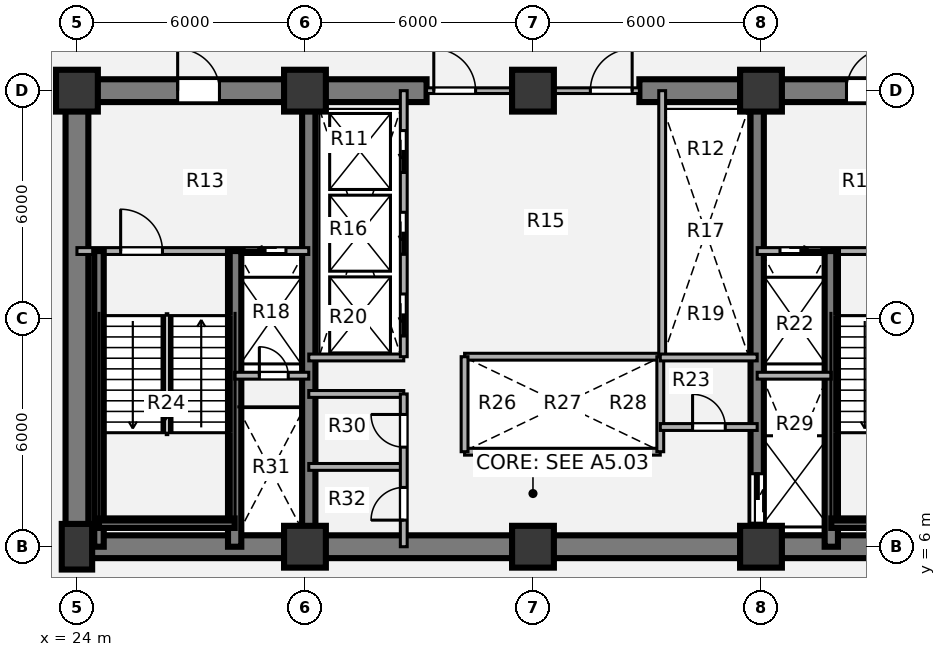
"""IFC4 building model, lengths in metres.
Left out: names, types, materials, properties, quantities, classifications, styles, units other than length and angle.
Written with IfcOpenShell. Run it as: python <this file> out.ifc"""

import sys

from ifc_helpers import new_model, si_unit, direction, frame, frame_2d, origin, origin_2d, place, context, subcontext, project, spatial, rectangle, extrude, source, transform, mapped, element, fill, save


model = new_model("IFC4")
c1 = context("Model", 3, precision=1e-05, world=origin(), true_north=direction((0.0, 1.0)))
c2 = subcontext(c1, "Body", "Model", "MODEL_VIEW")
j1 = project(units=[si_unit("LENGTHUNIT", "METRE"), si_unit("PLANEANGLEUNIT", "RADIAN")], contexts=[c1])
p1 = place(None, origin())
s1 = spatial("IfcSite", under=j1, at=p1, CompositionType="ELEMENT")
p2 = place(p1, origin())
s2 = spatial("IfcBuilding", under=s1, at=p2, CompositionType="ELEMENT")
p3 = place(p2, frame((0.0, 0.0, 18.36)))
s3 = spatial("IfcBuildingStorey", under=s2, at=p3, CompositionType="ELEMENT", Elevation=18.36)
m1 = source(origin(), c2, "Body", "SweptSolid", [
    extrude(rectangle(XDim=0.8, YDim=1.2, at=origin_2d()), origin(), (0.0, 0.0, 1.0), 4.32),
])
p4 = place(p3, frame((24.0, 6.0, 0.0), z_axis=(0.0, 0.0, 1.0), x_axis=(1.0, 0.0, 0.0)))
e1 = element("IfcColumn", 1, at=p4, inside=s3, PredefinedType="COLUMN", context=c2, shape_type="MappedRepresentation", body=[
    mapped(m1, transform((0.0, 0.0, 0.0), x_axis=(1.0, 0.0, 0.0), y_axis=(0.0, 1.0, 0.0), z_axis=(0.0, 0.0, 1.0), scale=1.0)),
])
m2 = source(origin(), c2, "Body", "SweptSolid", [
    extrude(rectangle(XDim=1.1, YDim=1.1, at=origin_2d()), origin(), (0.0, 0.0, 1.0), 4.32),
])
for number, where, z_axis, x_axis in (
    (2, (30.0, 6.0, 0.0), (0.0, 0.0, 1.0), (1.0, 0.0, 0.0)),
    (3, (36.0, 6.0, 0.0), (0.0, 0.0, 1.0), (1.0, 0.0, 0.0)),
    (4, (42.0, 6.0, 0.0), (0.0, 0.0, 1.0), (1.0, 0.0, 0.0)),
    (5, (24.0, 18.0, 0.0), (0.0, 0.0, 1.0), (1.0, 0.0, 0.0)),
    (6, (30.0, 18.0, 0.0), (0.0, 0.0, 1.0), (1.0, 0.0, 0.0)),
    (7, (36.0, 18.0, 0.0), (0.0, 0.0, 1.0), (1.0, 0.0, 0.0)),
    (8, (42.0, 18.0, 0.0), (0.0, 0.0, 1.0), (1.0, 0.0, 0.0)),
):
    element("IfcColumn", number, at=place(p3, frame(where, z_axis=z_axis, x_axis=x_axis)), inside=s3, PredefinedType="COLUMN", context=c2, shape_type="MappedRepresentation", body=[
        mapped(m2, transform((0.0, 0.0, 0.0), x_axis=(1.0, 0.0, 0.0), y_axis=(0.0, 1.0, 0.0), z_axis=(0.0, 0.0, 1.0), scale=1.0)),
    ])
p5 = place(p3, frame((48.3, 6.0, 0.0), z_axis=(0.0, 0.0, 1.0), x_axis=(-1.0, 0.0, 0.0)))
e9 = element("IfcWall", 9, at=p5, inside=s3, PredefinedType="SHEAR", context=c2, shape_type="SweptSolid", body=[
    extrude(rectangle(XDim=24.6, YDim=0.6, at=frame_2d((12.3, 0.0))), origin(), (0.0, 0.0, 1.0), 4.32),
])
p6 = place(p3, frame((24.0, 6.0, 0.0), z_axis=(0.0, 0.0, 1.0), x_axis=(0.0, 1.0, 0.0)))
e10 = element("IfcWall", 10, at=p6, inside=s3, PredefinedType="SHEAR", context=c2, shape_type="SweptSolid", body=[
    extrude(rectangle(XDim=12.0, YDim=0.6, at=frame_2d((6.0, 0.0))), origin(), (0.0, 0.0, 1.0), 4.32),
])
p7 = place(p3, frame((23.7, 18.0, 0.0), z_axis=(0.0, 0.0, 1.0), x_axis=(1.0, 0.0, 0.0)))
e11 = element("IfcWall", 11, at=p7, inside=s3, PredefinedType="SHEAR", context=c2, shape_type="SweptSolid", body=[
    extrude(rectangle(XDim=9.5, YDim=0.6, at=frame_2d((4.75, 0.0))), origin(), (0.0, 0.0, 1.0), 4.32),
])
p8 = place(p7, frame((2.95, 0.0, 0.0)))
e12 = element("IfcOpeningElement", 12, at=p8, cuts=e11, PredefinedType="OPENING", context=c2, shape_type="SweptSolid", body=[
    extrude(rectangle(XDim=1.1, YDim=2.1, at=origin_2d()), frame((0.55, 0.31, 1.05), z_axis=(0.0, -1.0, 0.0), x_axis=(1.0, 0.0, 0.0)), (0.0, 0.0, 1.0), 0.62),
])
p9 = place(p3, frame((38.8, 18.0, 0.0), z_axis=(0.0, 0.0, 1.0), x_axis=(1.0, 0.0, 0.0)))
e13 = element("IfcWall", 13, at=p9, inside=s3, PredefinedType="SHEAR", context=c2, shape_type="SweptSolid", body=[
    extrude(rectangle(XDim=9.5, YDim=0.6, at=frame_2d((4.75, 0.0))), origin(), (0.0, 0.0, 1.0), 4.32),
])
p10 = place(p9, frame((5.45, 0.0, 0.0)))
e14 = element("IfcOpeningElement", 14, at=p10, cuts=e13, PredefinedType="OPENING", context=c2, shape_type="SweptSolid", body=[
    extrude(rectangle(XDim=1.1, YDim=2.1, at=origin_2d()), frame((0.55, 0.31, 1.05), z_axis=(0.0, -1.0, 0.0), x_axis=(1.0, 0.0, 0.0)), (0.0, 0.0, 1.0), 0.62),
])
p11 = place(p3, frame((30.1, 6.0, 0.0), z_axis=(0.0, 0.0, 1.0), x_axis=(0.0, 1.0, 0.0)))
e15 = element("IfcWall", 15, at=p11, inside=s3, PredefinedType="SHEAR", context=c2, shape_type="SweptSolid", body=[
    extrude(rectangle(XDim=12.0, YDim=0.35, at=frame_2d((6.0, 0.0))), origin(), (0.0, 0.0, 1.0), 4.32),
])
p12 = place(p3, frame((41.9, 18.0, 0.0), z_axis=(0.0, 0.0, 1.0), x_axis=(0.0, -1.0, 0.0)))
e16 = element("IfcWall", 16, at=p12, inside=s3, PredefinedType="SHEAR", context=c2, shape_type="SweptSolid", body=[
    extrude(rectangle(XDim=12.0, YDim=0.35, at=frame_2d((6.0, 0.0))), origin(), (0.0, 0.0, 1.0), 4.32),
])
p13 = place(p12, frame((10.08, 0.0, 0.0)))
e17 = element("IfcOpeningElement", 17, at=p13, cuts=e16, PredefinedType="OPENING", context=c2, shape_type="SweptSolid", body=[
    extrude(rectangle(XDim=1.3, YDim=2.1, at=origin_2d()), frame((0.65, 0.185, 1.05), z_axis=(0.0, -1.0, 0.0), x_axis=(1.0, 0.0, 0.0)), (0.0, 0.0, 1.0), 0.37),
])
for number, where, z_axis, x_axis in (
    (18, (34.2, 11.0, 0.0), (0.0, 0.0, 1.0), (1.0, 0.0, 0.0)),
    (19, (34.2, 8.5, 0.0), (0.0, 0.0, 1.0), (1.0, 0.0, 0.0)),
):
    element("IfcWall", number, at=place(p3, frame(where, z_axis=z_axis, x_axis=x_axis)), inside=s3, PredefinedType="PARTITIONING", context=c2, shape_type="SweptSolid", body=[
        extrude(rectangle(XDim=5.15, YDim=0.18, at=frame_2d((2.575, 0.0))), origin(), (0.0, 0.0, 1.0), 4.01),
    ])
for number, where, z_axis, x_axis in (
    (20, (34.2, 8.5, 0.0), (0.0, 0.0, 1.0), (0.0, 1.0, 0.0)),
    (21, (39.35, 8.5, 0.0), (0.0, 0.0, 1.0), (0.0, 1.0, 0.0)),
):
    element("IfcWall", number, at=place(p3, frame(where, z_axis=z_axis, x_axis=x_axis)), inside=s3, PredefinedType="PARTITIONING", context=c2, shape_type="SweptSolid", body=[
        extrude(rectangle(XDim=2.5, YDim=0.18, at=frame_2d((1.25, 0.0))), origin(), (0.0, 0.0, 1.0), 4.01),
    ])
p14 = place(p3, frame((39.4, 11.0, 0.0), z_axis=(0.0, 0.0, 1.0), x_axis=(0.0, 1.0, 0.0)))
e22 = element("IfcWall", 22, at=p14, inside=s3, PredefinedType="PARTITIONING", context=c2, shape_type="SweptSolid", body=[
    extrude(rectangle(XDim=7.0, YDim=0.18, at=frame_2d((3.5, 0.0))), origin(), (0.0, 0.0, 1.0), 4.01),
])
p15 = place(p3, frame((30.1, 10.98, 0.0), z_axis=(0.0, 0.0, 1.0), x_axis=(1.0, 0.0, 0.0)))
e23 = element("IfcWall", 23, at=p15, inside=s3, PredefinedType="PARTITIONING", context=c2, shape_type="SweptSolid", body=[
    extrude(rectangle(XDim=2.5, YDim=0.18, at=frame_2d((1.25, 0.0))), origin(), (0.0, 0.0, 1.0), 4.01),
])
p16 = place(p3, frame((39.35, 10.98, 0.0), z_axis=(0.0, 0.0, 1.0), x_axis=(1.0, 0.0, 0.0)))
e24 = element("IfcWall", 24, at=p16, inside=s3, PredefinedType="PARTITIONING", context=c2, shape_type="SweptSolid", body=[
    extrude(rectangle(XDim=2.55, YDim=0.18, at=frame_2d((1.275, 0.0))), origin(), (0.0, 0.0, 1.0), 4.01),
])
for number, where, z_axis, x_axis in (
    (25, (30.1, 8.1, 0.0), (0.0, 0.0, 1.0), (1.0, 0.0, 0.0)),
    (26, (30.1, 10.02, 0.0), (0.0, 0.0, 1.0), (1.0, 0.0, 0.0)),
):
    element("IfcWall", number, at=place(p3, frame(where, z_axis=z_axis, x_axis=x_axis)), inside=s3, PredefinedType="PARTITIONING", context=c2, shape_type="SweptSolid", body=[
        extrude(rectangle(XDim=2.5, YDim=0.18, at=frame_2d((1.25, 0.0))), origin(), (0.0, 0.0, 1.0), 4.01),
    ])
p17 = place(p3, frame((32.6, 6.0, 0.0), z_axis=(0.0, 0.0, 1.0), x_axis=(0.0, 1.0, 0.0)))
e27 = element("IfcWall", 27, at=p17, inside=s3, PredefinedType="PARTITIONING", context=c2, shape_type="SweptSolid", body=[
    extrude(rectangle(XDim=4.02, YDim=0.18, at=frame_2d((2.01, 0.0))), origin(), (0.0, 0.0, 1.0), 4.01),
])
p18 = place(p17, frame((0.7, 0.0, 0.0)))
e28 = element("IfcOpeningElement", 28, at=p18, cuts=e27, PredefinedType="OPENING", context=c2, shape_type="SweptSolid", body=[
    extrude(rectangle(XDim=0.86, YDim=2.1, at=origin_2d()), frame((0.43, 0.1, 1.05), z_axis=(0.0, -1.0, 0.0), x_axis=(1.0, 0.0, 0.0)), (0.0, 0.0, 1.0), 0.2),
])
p19 = place(p17, frame((2.62, 0.0, 0.0)))
e29 = element("IfcOpeningElement", 29, at=p19, cuts=e27, PredefinedType="OPENING", context=c2, shape_type="SweptSolid", body=[
    extrude(rectangle(XDim=0.86, YDim=2.1, at=origin_2d()), frame((0.43, 0.1, 1.05), z_axis=(0.0, -1.0, 0.0), x_axis=(1.0, 0.0, 0.0)), (0.0, 0.0, 1.0), 0.2),
])
p20 = place(p3, frame((39.35, 9.15, 0.0), z_axis=(0.0, 0.0, 1.0), x_axis=(1.0, 0.0, 0.0)))
e30 = element("IfcWall", 30, at=p20, inside=s3, PredefinedType="PARTITIONING", context=c2, shape_type="SweptSolid", body=[
    extrude(rectangle(XDim=2.55, YDim=0.18, at=frame_2d((1.275, 0.0))), origin(), (0.0, 0.0, 1.0), 4.01),
])
p21 = place(p20, frame((0.85, 0.0, 0.0)))
e31 = element("IfcOpeningElement", 31, at=p21, cuts=e30, PredefinedType="OPENING", context=c2, shape_type="SweptSolid", body=[
    extrude(rectangle(XDim=0.86, YDim=2.1, at=origin_2d()), frame((0.43, 0.1, 1.05), z_axis=(0.0, -1.0, 0.0), x_axis=(1.0, 0.0, 0.0)), (0.0, 0.0, 1.0), 0.2),
])
p22 = place(p3, frame((33.2, 18.0, 0.0), z_axis=(0.0, 0.0, 1.0), x_axis=(1.0, 0.0, 0.0)))
e32 = element("IfcWall", 32, at=p22, inside=s3, PredefinedType="PARTITIONING", context=c2, shape_type="SweptSolid", body=[
    extrude(rectangle(XDim=5.6, YDim=0.15, at=frame_2d((2.8, 0.0))), origin(), (0.0, 0.0, 1.0), 2.825),
])
p23 = place(p22, frame((0.19, 0.0, 0.0)))
e33 = element("IfcOpeningElement", 33, at=p23, cuts=e32, PredefinedType="OPENING", context=c2, shape_type="SweptSolid", body=[
    extrude(rectangle(XDim=1.1, YDim=2.1, at=origin_2d()), frame((0.55, 0.085, 1.05), z_axis=(0.0, -1.0, 0.0), x_axis=(1.0, 0.0, 0.0)), (0.0, 0.0, 1.0), 0.17),
])
p24 = place(p22, frame((4.31, 0.0, 0.0)))
e34 = element("IfcOpeningElement", 34, at=p24, cuts=e32, PredefinedType="OPENING", context=c2, shape_type="SweptSolid", body=[
    extrude(rectangle(XDim=1.1, YDim=2.1, at=origin_2d()), frame((0.55, 0.085, 1.05), z_axis=(0.0, -1.0, 0.0), x_axis=(1.0, 0.0, 0.0)), (0.0, 0.0, 1.0), 0.17),
])
p25 = place(p3, frame((24.0, 13.78, 0.0), z_axis=(0.0, 0.0, 1.0), x_axis=(1.0, 0.0, 0.0)))
e35 = element("IfcWall", 35, at=p25, inside=s3, PredefinedType="PARTITIONING", context=c2, shape_type="SweptSolid", body=[
    extrude(rectangle(XDim=6.1, YDim=0.18, at=frame_2d((3.05, 0.0))), origin(), (0.0, 0.0, 1.0), 4.01),
])
p26 = place(p25, frame((1.15, 0.0, 0.0)))
e36 = element("IfcOpeningElement", 36, at=p26, cuts=e35, PredefinedType="OPENING", context=c2, shape_type="SweptSolid", body=[
    extrude(rectangle(XDim=1.1, YDim=2.1, at=origin_2d()), frame((0.55, 0.1, 1.05), z_axis=(0.0, -1.0, 0.0), x_axis=(1.0, 0.0, 0.0)), (0.0, 0.0, 1.0), 0.2),
])
p27 = place(p25, frame((4.4, 0.0, 0.0)))
e37 = element("IfcOpeningElement", 37, at=p27, cuts=e35, PredefinedType="OPENING", context=c2, shape_type="SweptSolid", body=[
    extrude(rectangle(XDim=1.1, YDim=2.1, at=origin_2d()), frame((0.55, 0.1, 1.05), z_axis=(0.0, -1.0, 0.0), x_axis=(1.0, 0.0, 0.0)), (0.0, 0.0, 1.0), 0.2),
])
p28 = place(p3, frame((28.15, 6.0, 0.0), z_axis=(0.0, 0.0, 1.0), x_axis=(0.0, 1.0, 0.0)))
e38 = element("IfcWall", 38, at=p28, inside=s3, PredefinedType="SHEAR", context=c2, shape_type="SweptSolid", body=[
    extrude(rectangle(XDim=7.78, YDim=0.35, at=frame_2d((3.89, 0.0))), origin(), (0.0, 0.0, 1.0), 4.36),
])
p29 = place(p3, frame((24.58, 6.0, 0.0), z_axis=(0.0, 0.0, 1.0), x_axis=(0.0, 1.0, 0.0)))
e39 = element("IfcWall", 39, at=p29, inside=s3, PredefinedType="SHEAR", context=c2, shape_type="SweptSolid", body=[
    extrude(rectangle(XDim=7.78, YDim=0.25, at=frame_2d((3.89, 0.0))), origin(), (0.0, 0.0, 1.0), 4.36),
])
p30 = place(p3, frame((24.58, 6.62, 0.0), z_axis=(0.0, 0.0, 1.0), x_axis=(1.0, 0.0, 0.0)))
e40 = element("IfcWall", 40, at=p30, inside=s3, PredefinedType="SHEAR", context=c2, shape_type="SweptSolid", body=[
    extrude(rectangle(XDim=3.57, YDim=0.25, at=frame_2d((1.785, 0.0))), origin(), (0.0, 0.0, 1.0), 4.36),
])
p31 = place(p3, frame((28.15, 10.5, 0.0), z_axis=(0.0, 0.0, 1.0), x_axis=(1.0, 0.0, 0.0)))
e41 = element("IfcWall", 41, at=p31, inside=s3, PredefinedType="PARTITIONING", context=c2, shape_type="SweptSolid", body=[
    extrude(rectangle(XDim=1.95, YDim=0.18, at=frame_2d((0.975, 0.0))), origin(), (0.0, 0.0, 1.0), 4.01),
])
p32 = place(p31, frame((0.65, 0.0, 0.0)))
e42 = element("IfcOpeningElement", 42, at=p32, cuts=e41, PredefinedType="OPENING", context=c2, shape_type="SweptSolid", body=[
    extrude(rectangle(XDim=0.76, YDim=2.05, at=origin_2d()), frame((0.38, 0.1, 1.025), z_axis=(0.0, -1.0, 0.0), x_axis=(1.0, 0.0, 0.0)), (0.0, 0.0, 1.0), 0.2),
])
p33 = place(p3, frame((41.9, 13.78, 0.0), z_axis=(0.0, 0.0, 1.0), x_axis=(1.0, 0.0, 0.0)))
e43 = element("IfcWall", 43, at=p33, inside=s3, PredefinedType="PARTITIONING", context=c2, shape_type="SweptSolid", body=[
    extrude(rectangle(XDim=6.1, YDim=0.18, at=frame_2d((3.05, 0.0))), origin(), (0.0, 0.0, 1.0), 4.01),
])
p34 = place(p33, frame((0.6, 0.0, 0.0)))
e44 = element("IfcOpeningElement", 44, at=p34, cuts=e43, PredefinedType="OPENING", context=c2, shape_type="SweptSolid", body=[
    extrude(rectangle(XDim=1.1, YDim=2.1, at=origin_2d()), frame((0.55, 0.1, 1.05), z_axis=(0.0, -1.0, 0.0), x_axis=(1.0, 0.0, 0.0)), (0.0, 0.0, 1.0), 0.2),
])
p35 = place(p33, frame((3.8, 0.0, 0.0)))
e45 = element("IfcOpeningElement", 45, at=p35, cuts=e43, PredefinedType="OPENING", context=c2, shape_type="SweptSolid", body=[
    extrude(rectangle(XDim=1.1, YDim=2.1, at=origin_2d()), frame((0.55, 0.1, 1.05), z_axis=(0.0, -1.0, 0.0), x_axis=(1.0, 0.0, 0.0)), (0.0, 0.0, 1.0), 0.2),
])
p36 = place(p3, frame((43.85, 6.0, 0.0), z_axis=(0.0, 0.0, 1.0), x_axis=(0.0, 1.0, 0.0)))
e46 = element("IfcWall", 46, at=p36, inside=s3, PredefinedType="SHEAR", context=c2, shape_type="SweptSolid", body=[
    extrude(rectangle(XDim=7.78, YDim=0.35, at=frame_2d((3.89, 0.0))), origin(), (0.0, 0.0, 1.0), 4.36),
])
p37 = place(p3, frame((43.85, 6.62, 0.0), z_axis=(0.0, 0.0, 1.0), x_axis=(1.0, 0.0, 0.0)))
e47 = element("IfcWall", 47, at=p37, inside=s3, PredefinedType="SHEAR", context=c2, shape_type="SweptSolid", body=[
    extrude(rectangle(XDim=3.57, YDim=0.25, at=frame_2d((1.785, 0.0))), origin(), (0.0, 0.0, 1.0), 4.36),
])
p38 = place(p3, frame((41.9, 10.5, 0.0), z_axis=(0.0, 0.0, 1.0), x_axis=(1.0, 0.0, 0.0)))
e48 = element("IfcWall", 48, at=p38, inside=s3, PredefinedType="PARTITIONING", context=c2, shape_type="SweptSolid", body=[
    extrude(rectangle(XDim=1.95, YDim=0.18, at=frame_2d((0.975, 0.0))), origin(), (0.0, 0.0, 1.0), 4.01),
])
p39 = place(p3, frame((32.6, 11.0, 0.0), z_axis=(0.0, 0.0, 1.0), x_axis=(0.0, 1.0, 0.0)))
e49 = element("IfcWall", 49, at=p39, inside=s3, PredefinedType="PARTITIONING", context=c2, shape_type="SweptSolid", body=[
    extrude(rectangle(XDim=7.0, YDim=0.18, at=frame_2d((3.5, 0.0))), origin(), (0.0, 0.0, 1.0), 4.01),
])
p40 = place(p39, frame((0.55, 0.0, 0.0)))
e50 = element("IfcOpeningElement", 50, at=p40, cuts=e49, PredefinedType="OPENING", context=c2, shape_type="SweptSolid", body=[
    extrude(rectangle(XDim=1.1, YDim=2.1, at=origin_2d()), frame((0.55, 0.1, 1.05), z_axis=(0.0, -1.0, 0.0), x_axis=(1.0, 0.0, 0.0)), (0.0, 0.0, 1.0), 0.2),
])
p41 = place(p39, frame((2.7, 0.0, 0.0)))
e51 = element("IfcOpeningElement", 51, at=p41, cuts=e49, PredefinedType="OPENING", context=c2, shape_type="SweptSolid", body=[
    extrude(rectangle(XDim=1.1, YDim=2.1, at=origin_2d()), frame((0.55, 0.1, 1.05), z_axis=(0.0, -1.0, 0.0), x_axis=(1.0, 0.0, 0.0)), (0.0, 0.0, 1.0), 0.2),
])
p42 = place(p39, frame((4.85, 0.0, 0.0)))
e52 = element("IfcOpeningElement", 52, at=p42, cuts=e49, PredefinedType="OPENING", context=c2, shape_type="SweptSolid", body=[
    extrude(rectangle(XDim=1.1, YDim=2.1, at=origin_2d()), frame((0.55, 0.1, 1.05), z_axis=(0.0, -1.0, 0.0), x_axis=(1.0, 0.0, 0.0)), (0.0, 0.0, 1.0), 0.2),
])
m3 = source(origin(), c2, "Body", "SweptSolid", [
    extrude(rectangle(XDim=0.86, YDim=2.1, at=origin_2d()), frame((0.43, 0.025, 1.05), z_axis=(0.0, -1.0, 0.0), x_axis=(1.0, 0.0, 0.0)), (0.0, 0.0, 1.0), 0.05),
])
p43 = place(p18, origin())
e53 = element("IfcDoor", 53, at=p43, inside=s3, OperationType="SINGLE_SWING_LEFT", PredefinedType="DOOR", context=c2, shape_type="MappedRepresentation", body=[
    mapped(m3, transform((0.0, 0.0, 0.0), x_axis=(1.0, 0.0, 0.0), y_axis=(0.0, 1.0, 0.0), z_axis=(0.0, 0.0, 1.0), scale=1.0)),
])
fill(e28, e53)
p44 = place(p19, origin())
e54 = element("IfcDoor", 54, at=p44, inside=s3, OperationType="SINGLE_SWING_RIGHT", PredefinedType="DOOR", context=c2, shape_type="MappedRepresentation", body=[
    mapped(m3, transform((0.0, 0.0, 0.0), x_axis=(1.0, 0.0, 0.0), y_axis=(0.0, 1.0, 0.0), z_axis=(0.0, 0.0, 1.0), scale=1.0)),
])
fill(e29, e54)
p45 = place(p21, origin())
e55 = element("IfcDoor", 55, at=p45, inside=s3, OperationType="SINGLE_SWING_LEFT", PredefinedType="DOOR", context=c2, shape_type="MappedRepresentation", body=[
    mapped(m3, transform((0.0, 0.0, 0.0), x_axis=(1.0, 0.0, 0.0), y_axis=(0.0, 1.0, 0.0), z_axis=(0.0, 0.0, 1.0), scale=1.0)),
])
fill(e31, e55)
m4 = source(origin(), c2, "Body", "SweptSolid", [
    extrude(rectangle(XDim=1.1, YDim=2.1, at=origin_2d()), frame((0.55, 0.025, 1.05), z_axis=(0.0, -1.0, 0.0), x_axis=(1.0, 0.0, 0.0)), (0.0, 0.0, 1.0), 0.05),
])
p46 = place(p23, origin())
e56 = element("IfcDoor", 56, at=p46, inside=s3, OperationType="SINGLE_SWING_LEFT", PredefinedType="DOOR", context=c2, shape_type="MappedRepresentation", body=[
    mapped(m4, transform((0.0, 0.0, 0.0), x_axis=(1.0, 0.0, 0.0), y_axis=(0.0, 1.0, 0.0), z_axis=(0.0, 0.0, 1.0), scale=1.0)),
])
fill(e33, e56)
p47 = place(p24, origin())
e57 = element("IfcDoor", 57, at=p47, inside=s3, OperationType="SINGLE_SWING_RIGHT", PredefinedType="DOOR", context=c2, shape_type="MappedRepresentation", body=[
    mapped(m4, transform((0.0, 0.0, 0.0), x_axis=(1.0, 0.0, 0.0), y_axis=(0.0, 1.0, 0.0), z_axis=(0.0, 0.0, 1.0), scale=1.0)),
])
fill(e34, e57)
m5 = source(origin(), c2, "Body", "SweptSolid", [
    extrude(rectangle(XDim=1.1, YDim=2.1, at=origin_2d()), frame((0.55, 0.025, 1.05), z_axis=(0.0, -1.0, 0.0), x_axis=(1.0, 0.0, 0.0)), (0.0, 0.0, 1.0), 0.05),
])
p48 = place(p26, origin())
e58 = element("IfcDoor", 58, at=p48, inside=s3, OperationType="SINGLE_SWING_LEFT", PredefinedType="DOOR", context=c2, shape_type="MappedRepresentation", body=[
    mapped(m5, transform((0.0, 0.0, 0.0), x_axis=(1.0, 0.0, 0.0), y_axis=(0.0, 1.0, 0.0), z_axis=(0.0, 0.0, 1.0), scale=1.0)),
])
fill(e36, e58)
m6 = source(origin(), c2, "Body", "SweptSolid", [
    extrude(rectangle(XDim=1.1, YDim=2.1, at=origin_2d()), frame((0.55, 0.025, 1.05), z_axis=(0.0, -1.0, 0.0), x_axis=(1.0, 0.0, 0.0)), (0.0, 0.0, 1.0), 0.05),
])
p49 = place(p27, origin())
e59 = element("IfcDoor", 59, at=p49, inside=s3, OperationType="SLIDING_TO_LEFT", PredefinedType="DOOR", context=c2, shape_type="MappedRepresentation", body=[
    mapped(m6, transform((0.0, 0.0, 0.0), x_axis=(1.0, 0.0, 0.0), y_axis=(0.0, 1.0, 0.0), z_axis=(0.0, 0.0, 1.0), scale=1.0)),
])
fill(e37, e59)
m7 = source(origin(), c2, "Body", "SweptSolid", [
    extrude(rectangle(XDim=0.76, YDim=2.05, at=origin_2d()), frame((0.38, 0.025, 1.025), z_axis=(0.0, -1.0, 0.0), x_axis=(1.0, 0.0, 0.0)), (0.0, 0.0, 1.0), 0.05),
])
p50 = place(p32, origin())
e60 = element("IfcDoor", 60, at=p50, inside=s3, OperationType="SINGLE_SWING_LEFT", PredefinedType="DOOR", context=c2, shape_type="MappedRepresentation", body=[
    mapped(m7, transform((0.0, 0.0, 0.0), x_axis=(1.0, 0.0, 0.0), y_axis=(0.0, 1.0, 0.0), z_axis=(0.0, 0.0, 1.0), scale=1.0)),
])
fill(e42, e60)
p51 = place(p34, origin())
e61 = element("IfcDoor", 61, at=p51, inside=s3, OperationType="SLIDING_TO_RIGHT", PredefinedType="DOOR", context=c2, shape_type="MappedRepresentation", body=[
    mapped(m6, transform((0.0, 0.0, 0.0), x_axis=(1.0, 0.0, 0.0), y_axis=(0.0, 1.0, 0.0), z_axis=(0.0, 0.0, 1.0), scale=1.0)),
])
fill(e44, e61)
m8 = source(origin(), c2, "Body", "SweptSolid", [
    extrude(rectangle(XDim=1.3, YDim=2.1, at=origin_2d()), frame((0.65, 0.025, 1.05), z_axis=(0.0, -1.0, 0.0), x_axis=(1.0, 0.0, 0.0)), (0.0, 0.0, 1.0), 0.05),
])
p52 = place(p13, origin())
e62 = element("IfcDoor", 62, at=p52, inside=s3, OperationType="SLIDING_TO_LEFT", PredefinedType="DOOR", context=c2, shape_type="MappedRepresentation", body=[
    mapped(m8, transform((0.0, 0.0, 0.0), x_axis=(1.0, 0.0, 0.0), y_axis=(0.0, 1.0, 0.0), z_axis=(0.0, 0.0, 1.0), scale=1.0)),
])
fill(e17, e62)
p53 = place(p8, origin())
e63 = element("IfcDoor", 63, at=p53, inside=s3, OperationType="SINGLE_SWING_LEFT", PredefinedType="DOOR", context=c2, shape_type="MappedRepresentation", body=[
    mapped(m4, transform((0.0, 0.0, 0.0), x_axis=(1.0, 0.0, 0.0), y_axis=(0.0, 1.0, 0.0), z_axis=(0.0, 0.0, 1.0), scale=1.0)),
])
fill(e12, e63)
p54 = place(p10, origin())
e64 = element("IfcDoor", 64, at=p54, inside=s3, OperationType="SINGLE_SWING_RIGHT", PredefinedType="DOOR", context=c2, shape_type="MappedRepresentation", body=[
    mapped(m4, transform((0.0, 0.0, 0.0), x_axis=(1.0, 0.0, 0.0), y_axis=(0.0, 1.0, 0.0), z_axis=(0.0, 0.0, 1.0), scale=1.0)),
])
fill(e14, e64)
p55 = place(p40, origin())
e65 = element("IfcDoor", 65, at=p55, inside=s3, OperationType="SLIDING_TO_LEFT", PredefinedType="DOOR", context=c2, shape_type="MappedRepresentation", body=[
    mapped(m6, transform((0.0, 0.0, 0.0), x_axis=(1.0, 0.0, 0.0), y_axis=(0.0, 1.0, 0.0), z_axis=(0.0, 0.0, 1.0), scale=1.0)),
])
fill(e50, e65)
p56 = place(p41, origin())
e66 = element("IfcDoor", 66, at=p56, inside=s3, OperationType="SLIDING_TO_LEFT", PredefinedType="DOOR", context=c2, shape_type="MappedRepresentation", body=[
    mapped(m6, transform((0.0, 0.0, 0.0), x_axis=(1.0, 0.0, 0.0), y_axis=(0.0, 1.0, 0.0), z_axis=(0.0, 0.0, 1.0), scale=1.0)),
])
fill(e51, e66)
p57 = place(p42, origin())
e67 = element("IfcDoor", 67, at=p57, inside=s3, OperationType="SLIDING_TO_LEFT", PredefinedType="DOOR", context=c2, shape_type="MappedRepresentation", body=[
    mapped(m6, transform((0.0, 0.0, 0.0), x_axis=(1.0, 0.0, 0.0), y_axis=(0.0, 1.0, 0.0), z_axis=(0.0, 0.0, 1.0), scale=1.0)),
])
fill(e52, e67)
save(model, sys.argv[1])
